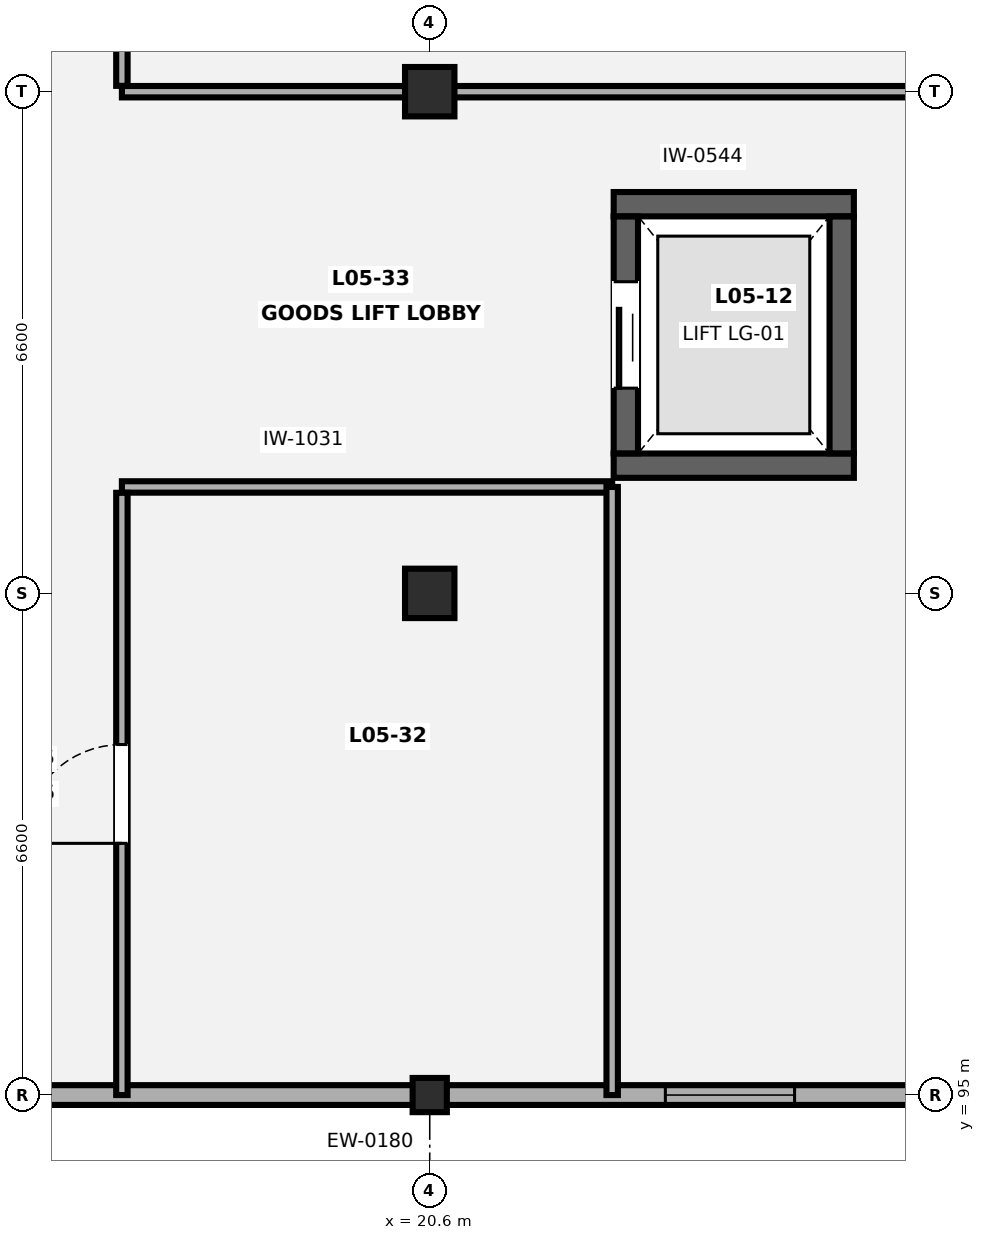
"""IFC4 building model, lengths in metres.
Left out: names, types, materials, properties, quantities, classifications, styles, units other than length and angle.
Written with IfcOpenShell. Run it as: python <this file> out.ifc"""

import sys

from ifc_helpers import new_model, si_unit, direction, frame, frame_2d, origin, origin_2d, place, context, subcontext, project, spatial, rectangle, extrude, element, fill, save


model = new_model("IFC4")
c1 = context("Model", 3, precision=1e-05, world=origin(), true_north=direction((0.0, 1.0)))
c2 = subcontext(c1, "Body", "Model", "MODEL_VIEW")
j1 = project(units=[si_unit("LENGTHUNIT", "METRE"), si_unit("PLANEANGLEUNIT", "RADIAN")], contexts=[c1])
p1 = place(None, origin())
s1 = spatial("IfcSite", under=j1, at=p1, CompositionType="ELEMENT")
p2 = place(p1, origin())
s2 = spatial("IfcBuilding", under=s1, at=p2, CompositionType="ELEMENT")
p3 = place(p2, frame((0.0, 0.0, 21.7)))
s3 = spatial("IfcBuildingStorey", under=s2, at=p3, CompositionType="ELEMENT", Elevation=21.7)
p4 = place(p3, frame((20.6, 95.0, 0.0), z_axis=(0.0, 0.0, 1.0), x_axis=(1.0, 0.0, 0.0)))
e1 = element("IfcColumn", 1, at=p4, inside=s3, PredefinedType="PILASTER", context=c2, shape_type="SweptSolid", body=[
    extrude(rectangle(XDim=0.45, YDim=0.45, at=origin_2d()), origin(), (0.0, 0.0, 1.0), 4.2),
])
for number, where, z_axis, x_axis in (
    (2, (20.6, 101.6, 0.0), (0.0, 0.0, 1.0), (1.0, 0.0, 0.0)),
    (3, (20.6, 108.2, 0.0), (0.0, 0.0, 1.0), (1.0, 0.0, 0.0)),
):
    element("IfcColumn", number, at=place(p3, frame(where, z_axis=z_axis, x_axis=x_axis)), inside=s3, PredefinedType="COLUMN", context=c2, shape_type="SweptSolid", body=[
        extrude(rectangle(XDim=0.65, YDim=0.65, at=origin_2d()), origin(), (0.0, 0.0, 1.0), 4.2),
    ])
p5 = place(p3, frame((26.977, 95.0, 0.0), z_axis=(0.0, 0.0, 1.0), x_axis=(-1.0, 0.0, 0.0)))
e4 = element("IfcWall", 4, at=p5, inside=s3, PredefinedType="SOLIDWALL", context=c2, shape_type="SweptSolid", body=[
    extrude(rectangle(XDim=19.354, YDim=0.26, at=frame_2d((9.677, 0.0))), origin(), (0.0, 0.0, 1.0), 2.48),
])
p6 = place(p5, frame((1.577, 0.0, 0.85)))
e5 = element("IfcOpeningElement", 5, at=p6, cuts=e4, PredefinedType="OPENING", context=c2, shape_type="SweptSolid", body=[
    extrude(rectangle(XDim=1.7, YDim=1.4, at=frame_2d((0.85, 0.7))), frame((0.0, 0.14, 0.0), z_axis=(0.0, -1.0, 0.0), x_axis=(1.0, 0.0, 0.0)), (0.0, 0.0, 1.0), 0.28),
])
for number, where, z_axis, x_axis in (
    (6, (23.02, 103.28, 0.0), (0.0, 0.0, 1.0), (1.0, 0.0, 0.0)),
    (7, (23.02, 106.72, 0.0), (0.0, 0.0, 1.0), (1.0, 0.0, 0.0)),
):
    element("IfcWall", number, at=place(p3, frame(where, z_axis=z_axis, x_axis=x_axis)), inside=s3, PredefinedType="SHEAR", context=c2, shape_type="SweptSolid", body=[
        extrude(rectangle(XDim=3.16, YDim=0.32, at=frame_2d((1.58, 0.0))), origin(), (0.0, 0.0, 1.0), 3.9),
    ])
p7 = place(p3, frame((23.18, 103.442, 0.0), z_axis=(0.0, 0.0, 1.0), x_axis=(0.0, 1.0, 0.0)))
e8 = element("IfcWall", 8, at=p7, inside=s3, PredefinedType="SHEAR", context=c2, shape_type="SweptSolid", body=[
    extrude(rectangle(XDim=3.116, YDim=0.32, at=frame_2d((1.558, 0.0))), origin(), (0.0, 0.0, 1.0), 3.9),
])
p8 = place(p7, frame((0.858, 0.0, 0.0)))
e9 = element("IfcOpeningElement", 9, at=p8, cuts=e8, PredefinedType="OPENING", context=c2, shape_type="SweptSolid", body=[
    extrude(rectangle(XDim=1.4, YDim=2.25, at=frame_2d((0.7, 1.125))), frame((0.0, 0.17, 0.0), z_axis=(0.0, -1.0, 0.0), x_axis=(1.0, 0.0, 0.0)), (0.0, 0.0, 1.0), 0.34),
])
p9 = place(p3, frame((26.02, 103.442, 0.0), z_axis=(0.0, 0.0, 1.0), x_axis=(0.0, 1.0, 0.0)))
e10 = element("IfcWall", 10, at=p9, inside=s3, PredefinedType="SHEAR", context=c2, shape_type="SweptSolid", body=[
    extrude(rectangle(XDim=3.116, YDim=0.32, at=frame_2d((1.558, 0.0))), origin(), (0.0, 0.0, 1.0), 3.9),
])
p10 = place(p3, frame((16.55, 103.0, 0.0), z_axis=(0.0, 0.0, 1.0), x_axis=(1.0, 0.0, 0.0)))
e11 = element("IfcWall", 11, at=p10, inside=s3, PredefinedType="PARTITIONING", context=c2, shape_type="SweptSolid", body=[
    extrude(rectangle(XDim=6.45, YDim=0.15, at=frame_2d((3.225, 0.0))), origin(), (0.0, 0.0, 1.0), 3.9),
])
p11 = place(p3, frame((16.55, 95.0, 0.0), z_axis=(0.0, 0.0, 1.0), x_axis=(0.0, 1.0, 0.0)))
e12 = element("IfcWall", 12, at=p11, inside=s3, PredefinedType="PARTITIONING", context=c2, shape_type="SweptSolid", body=[
    extrude(rectangle(XDim=7.923, YDim=0.15, at=frame_2d((3.961, 0.0))), origin(), (0.0, 0.0, 1.0), 3.9),
])
p12 = place(p11, frame((3.312, 0.0, 0.0)))
e13 = element("IfcOpeningElement", 13, at=p12, cuts=e12, PredefinedType="OPENING", context=c2, shape_type="SweptSolid", body=[
    extrude(rectangle(XDim=1.3, YDim=2.2, at=frame_2d((0.65, 1.1))), frame((0.0, 0.085, 0.0), z_axis=(0.0, -1.0, 0.0), x_axis=(1.0, 0.0, 0.0)), (0.0, 0.0, 1.0), 0.17),
])
p13 = place(p3, frame((23.0, 95.0, 0.0), z_axis=(0.0, 0.0, 1.0), x_axis=(0.0, 1.0, 0.0)))
e14 = element("IfcWall", 14, at=p13, inside=s3, PredefinedType="PARTITIONING", context=c2, shape_type="SweptSolid", body=[
    extrude(rectangle(XDim=8.0, YDim=0.15, at=frame_2d((4.0, 0.0))), origin(), (0.0, 0.0, 1.0), 3.9),
])
p14 = place(p3, frame((16.55, 108.2, 0.0), z_axis=(0.0, 0.0, 1.0), x_axis=(1.0, 0.0, 0.0)))
e15 = element("IfcWall", 15, at=p14, inside=s3, PredefinedType="PARTITIONING", context=c2, shape_type="SweptSolid", body=[
    extrude(rectangle(XDim=10.65, YDim=0.15, at=frame_2d((5.325, 0.0))), origin(), (0.0, 0.0, 1.0), 2.435),
])
p15 = place(p3, frame((16.55, 108.277, 0.0), z_axis=(0.0, 0.0, 1.0), x_axis=(0.0, 1.0, 0.0)))
e16 = element("IfcWall", 16, at=p15, inside=s3, PredefinedType="PARTITIONING", context=c2, shape_type="SweptSolid", body=[
    extrude(rectangle(XDim=13.046, YDim=0.15, at=frame_2d((6.523, 0.0))), origin(), (0.0, 0.0, 1.0), 3.9),
])
p16 = place(p15, frame((5.873, 0.0, 0.0)))
e17 = element("IfcOpeningElement", 17, at=p16, cuts=e16, PredefinedType="OPENING", context=c2, shape_type="SweptSolid", body=[
    extrude(rectangle(XDim=1.3, YDim=2.2, at=frame_2d((0.65, 1.1))), frame((0.0, 0.085, 0.0), z_axis=(0.0, -1.0, 0.0), x_axis=(1.0, 0.0, 0.0)), (0.0, 0.0, 1.0), 0.17),
])
p17 = place(p6, origin())
e18 = element("IfcWindow", 18, at=p17, inside=s3, PartitioningType="SINGLE_PANEL", PredefinedType="WINDOW", context=c2, shape_type="SweptSolid", body=[
    extrude(rectangle(XDim=1.7, YDim=1.4, at=frame_2d((0.85, 0.7))), frame((0.0, 0.03, 0.0), z_axis=(0.0, -1.0, 0.0), x_axis=(1.0, 0.0, 0.0)), (0.0, 0.0, 1.0), 0.06),
])
fill(e5, e18)
p18 = place(p8, origin())
e19 = element("IfcDoor", 19, at=p18, inside=s3, OperationType="DOUBLE_DOOR_SLIDING", PredefinedType="DOOR", context=c2, shape_type="SweptSolid", body=[
    extrude(rectangle(XDim=1.4, YDim=2.25, at=frame_2d((0.7, 1.125))), frame((0.0, 0.025, 0.0), z_axis=(0.0, -1.0, 0.0), x_axis=(1.0, 0.0, 0.0)), (0.0, 0.0, 1.0), 0.05),
])
fill(e9, e19)
p19 = place(p12, origin())
e20 = element("IfcDoor", 20, at=p19, inside=s3, OperationType="SINGLE_SWING_LEFT", PredefinedType="DOOR", context=c2, shape_type="SweptSolid", body=[
    extrude(rectangle(XDim=1.3, YDim=2.2, at=frame_2d((0.65, 1.1))), frame((0.0, 0.025, 0.0), z_axis=(0.0, -1.0, 0.0), x_axis=(1.0, 0.0, 0.0)), (0.0, 0.0, 1.0), 0.05),
])
fill(e13, e20)
save(model, sys.argv[1])
